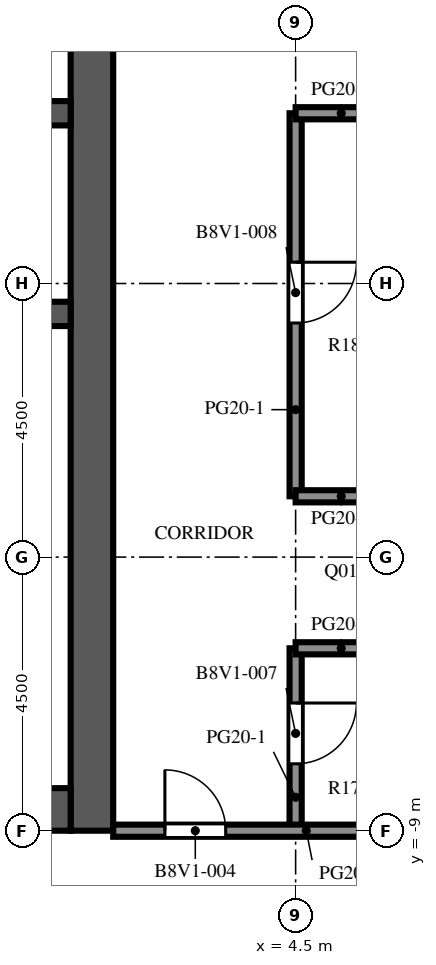
"""IFC4 building model, lengths in metres.
Left out: names, types, materials, properties, quantities, classifications, styles, units other than length and angle.
Written with IfcOpenShell. Run it as: python <this file> out.ifc"""

import sys

from ifc_helpers import new_model, si_unit, direction, frame, frame_2d, origin, place, context, subcontext, project, spatial, rectangle, extrude, element, fill, save


model = new_model("IFC4")
c1 = context("Model", 3, precision=1e-05, world=origin(), true_north=direction((0.0, 1.0)))
c2 = subcontext(c1, "Body", "Model", "MODEL_VIEW")
j1 = project(units=[si_unit("LENGTHUNIT", "METRE"), si_unit("PLANEANGLEUNIT", "RADIAN")], contexts=[c1])
p1 = place(None, origin())
s1 = spatial("IfcSite", under=j1, at=p1, CompositionType="ELEMENT")
p2 = place(p1, origin())
s2 = spatial("IfcBuilding", under=s1, at=p2, CompositionType="ELEMENT")
p3 = place(p2, frame((0.0, 0.0, 274.5)))
s3 = spatial("IfcBuildingStorey", under=s2, at=p3, CompositionType="ELEMENT", Elevation=274.5)
p4 = place(p3, frame((1.15, -9.0, 0.0), z_axis=(0.0, 0.0, 1.0), x_axis=(0.0, 1.0, 0.0)))
e1 = element("IfcWall", 1, at=p4, inside=s3, PredefinedType="SHEAR", context=c2, shape_type="SweptSolid", body=[
    extrude(rectangle(XDim=27.5, YDim=0.7, at=frame_2d((13.75, 0.0))), origin(), (0.0, 0.0, 1.0), 4.1),
])
p5 = place(p4, frame((12.55, 0.0, 0.0)))
e2 = element("IfcOpeningElement", 2, at=p5, cuts=e1, PredefinedType="OPENING", context=c2, shape_type="SweptSolid", body=[
    extrude(rectangle(XDim=2.4, YDim=2.4, at=frame_2d((1.2, 1.2))), frame((0.0, 0.36, 0.0), z_axis=(0.0, -1.0, 0.0), x_axis=(1.0, 0.0, 0.0)), (0.0, 0.0, 1.0), 0.72),
])
p6 = place(p4, frame((3.9, 0.0, 0.0)))
e3 = element("IfcOpeningElement", 3, at=p6, cuts=e1, PredefinedType="OPENING", context=c2, shape_type="SweptSolid", body=[
    extrude(rectangle(XDim=1.2, YDim=2.1, at=frame_2d((0.6, 1.05))), frame((0.0, 0.36, 0.0), z_axis=(0.0, -1.0, 0.0), x_axis=(1.0, 0.0, 0.0)), (0.0, 0.0, 1.0), 0.72),
])
p7 = place(p4, frame((19.46, 0.0, 0.0)))
e4 = element("IfcOpeningElement", 4, at=p7, cuts=e1, PredefinedType="OPENING", context=c2, shape_type="SweptSolid", body=[
    extrude(rectangle(XDim=1.0, YDim=2.1, at=frame_2d((0.5, 1.05))), frame((0.0, 0.36, 0.0), z_axis=(0.0, -1.0, 0.0), x_axis=(1.0, 0.0, 0.0)), (0.0, 0.0, 1.0), 0.72),
])
p8 = place(p4, frame((21.17, 0.0, 0.0)))
e5 = element("IfcOpeningElement", 5, at=p8, cuts=e1, PredefinedType="OPENING", context=c2, shape_type="SweptSolid", body=[
    extrude(rectangle(XDim=1.0, YDim=2.1, at=frame_2d((0.5, 1.05))), frame((0.0, 0.36, 0.0), z_axis=(0.0, -1.0, 0.0), x_axis=(1.0, 0.0, 0.0)), (0.0, 0.0, 1.0), 0.72),
])
p9 = place(p4, frame((23.26, 0.0, 0.0)))
e6 = element("IfcOpeningElement", 6, at=p9, cuts=e1, PredefinedType="OPENING", context=c2, shape_type="SweptSolid", body=[
    extrude(rectangle(XDim=1.0, YDim=2.1, at=frame_2d((0.5, 1.05))), frame((0.0, 0.36, 0.0), z_axis=(0.0, -1.0, 0.0), x_axis=(1.0, 0.0, 0.0)), (0.0, 0.0, 1.0), 0.72),
])
p10 = place(p4, frame((25.35, 0.0, 0.0)))
e7 = element("IfcOpeningElement", 7, at=p10, cuts=e1, PredefinedType="OPENING", context=c2, shape_type="SweptSolid", body=[
    extrude(rectangle(XDim=1.0, YDim=2.1, at=frame_2d((0.5, 1.05))), frame((0.0, 0.36, 0.0), z_axis=(0.0, -1.0, 0.0), x_axis=(1.0, 0.0, 0.0)), (0.0, 0.0, 1.0), 0.72),
])
p11 = place(p3, frame((-9.8, -8.65, 0.0), z_axis=(0.0, 0.0, 1.0), x_axis=(1.0, 0.0, 0.0)))
e8 = element("IfcWall", 8, at=p11, inside=s3, PredefinedType="SHEAR", context=c2, shape_type="SweptSolid", body=[
    extrude(rectangle(XDim=10.6, YDim=0.7, at=frame_2d((5.3, 0.0))), origin(), (0.0, 0.0, 1.0), 4.1),
])
p12 = place(p3, frame((-9.8, -0.5, 0.0), z_axis=(0.0, 0.0, 1.0), x_axis=(1.0, 0.0, 0.0)))
e9 = element("IfcWall", 9, at=p12, inside=s3, PredefinedType="SHEAR", context=c2, shape_type="SweptSolid", body=[
    extrude(rectangle(XDim=10.6, YDim=0.4, at=frame_2d((5.3, 0.0))), origin(), (0.0, 0.0, 1.0), 4.1),
])
p13 = place(p3, frame((-9.8, 2.8, 0.0), z_axis=(0.0, 0.0, 1.0), x_axis=(1.0, 0.0, 0.0)))
e10 = element("IfcWall", 10, at=p13, inside=s3, PredefinedType="SHEAR", context=c2, shape_type="SweptSolid", body=[
    extrude(rectangle(XDim=10.6, YDim=0.4, at=frame_2d((5.3, 0.0))), origin(), (0.0, 0.0, 1.0), 4.1),
])
p14 = place(p13, frame((0.688, 0.0, 0.0)))
e11 = element("IfcOpeningElement", 11, at=p14, cuts=e10, PredefinedType="OPENING", context=c2, shape_type="SweptSolid", body=[
    extrude(rectangle(XDim=1.1, YDim=2.1, at=frame_2d((0.55, 1.05))), frame((0.0, 0.21, 0.0), z_axis=(0.0, -1.0, 0.0), x_axis=(1.0, 0.0, 0.0)), (0.0, 0.0, 1.0), 0.42),
])
p15 = place(p13, frame((3.438, 0.0, 0.0)))
e12 = element("IfcOpeningElement", 12, at=p15, cuts=e10, PredefinedType="OPENING", context=c2, shape_type="SweptSolid", body=[
    extrude(rectangle(XDim=1.1, YDim=2.1, at=frame_2d((0.55, 1.05))), frame((0.0, 0.21, 0.0), z_axis=(0.0, -1.0, 0.0), x_axis=(1.0, 0.0, 0.0)), (0.0, 0.0, 1.0), 0.42),
])
p16 = place(p13, frame((6.113, 0.0, 0.0)))
e13 = element("IfcOpeningElement", 13, at=p16, cuts=e10, PredefinedType="OPENING", context=c2, shape_type="SweptSolid", body=[
    extrude(rectangle(XDim=1.0, YDim=2.1, at=frame_2d((0.5, 1.05))), frame((0.0, 0.21, 0.0), z_axis=(0.0, -1.0, 0.0), x_axis=(1.0, 0.0, 0.0)), (0.0, 0.0, 1.0), 0.42),
])
p17 = place(p13, frame((8.863, 0.0, 0.0)))
e14 = element("IfcOpeningElement", 14, at=p17, cuts=e10, PredefinedType="OPENING", context=c2, shape_type="SweptSolid", body=[
    extrude(rectangle(XDim=1.0, YDim=2.1, at=frame_2d((0.5, 1.05))), frame((0.0, 0.21, 0.0), z_axis=(0.0, -1.0, 0.0), x_axis=(1.0, 0.0, 0.0)), (0.0, 0.0, 1.0), 0.42),
])
p18 = place(p3, frame((-0.8, -6.02, 0.0), z_axis=(0.0, 0.0, 1.0), x_axis=(1.0, 0.0, 0.0)))
e15 = element("IfcWall", 15, at=p18, inside=s3, PredefinedType="PARTITIONING", context=c2, shape_type="SweptSolid", body=[
    extrude(rectangle(XDim=1.6, YDim=0.1, at=frame_2d((0.8, 0.0))), origin(), (0.0, 0.0, 1.0), 3.65),
])
p19 = place(p18, frame((0.3, 0.0, 0.0)))
e16 = element("IfcOpeningElement", 16, at=p19, cuts=e15, PredefinedType="OPENING", context=c2, shape_type="SweptSolid", body=[
    extrude(rectangle(XDim=1.0, YDim=2.1, at=frame_2d((0.5, 1.05))), frame((0.0, 0.06, 0.0), z_axis=(0.0, -1.0, 0.0), x_axis=(1.0, 0.0, 0.0)), (0.0, 0.0, 1.0), 0.12),
])
p20 = place(p3, frame((-0.8, -2.98, 0.0), z_axis=(0.0, 0.0, 1.0), x_axis=(1.0, 0.0, 0.0)))
e17 = element("IfcWall", 17, at=p20, inside=s3, PredefinedType="PARTITIONING", context=c2, shape_type="SweptSolid", body=[
    extrude(rectangle(XDim=1.6, YDim=0.1, at=frame_2d((0.8, 0.0))), origin(), (0.0, 0.0, 1.0), 3.65),
])
p21 = place(p20, frame((0.3, 0.0, 0.0)))
e18 = element("IfcOpeningElement", 18, at=p21, cuts=e17, PredefinedType="OPENING", context=c2, shape_type="SweptSolid", body=[
    extrude(rectangle(XDim=1.0, YDim=2.1, at=frame_2d((0.5, 1.05))), frame((0.0, 0.06, 0.0), z_axis=(0.0, -1.0, 0.0), x_axis=(1.0, 0.0, 0.0)), (0.0, 0.0, 1.0), 0.12),
])
p22 = place(p3, frame((4.5, -6.0, 0.0), z_axis=(0.0, 0.0, 1.0), x_axis=(0.0, -1.0, 0.0)))
e19 = element("IfcWall", 19, at=p22, inside=s3, PredefinedType="PARTITIONING", context=c2, shape_type="SweptSolid", body=[
    extrude(rectangle(XDim=3.0, YDim=0.2, at=frame_2d((1.5, 0.0))), origin(), (0.0, 0.0, 1.0), 3.65),
])
p23 = place(p22, frame((0.9, 0.0, 0.0)))
e20 = element("IfcOpeningElement", 20, at=p23, cuts=e19, PredefinedType="OPENING", context=c2, shape_type="SweptSolid", body=[
    extrude(rectangle(XDim=1.0, YDim=2.1, at=frame_2d((0.5, 1.05))), frame((0.0, 0.11, 0.0), z_axis=(0.0, -1.0, 0.0), x_axis=(1.0, 0.0, 0.0)), (0.0, 0.0, 1.0), 0.22),
])
p24 = place(p3, frame((4.5, 2.8, 0.0), z_axis=(0.0, 0.0, 1.0), x_axis=(0.0, -1.0, 0.0)))
e21 = element("IfcWall", 21, at=p24, inside=s3, PredefinedType="PARTITIONING", context=c2, shape_type="SweptSolid", body=[
    extrude(rectangle(XDim=6.3, YDim=0.2, at=frame_2d((3.15, 0.0))), origin(), (0.0, 0.0, 1.0), 3.65),
])
p25 = place(p24, frame((2.45, 0.0, 0.0)))
e22 = element("IfcOpeningElement", 22, at=p25, cuts=e21, PredefinedType="OPENING", context=c2, shape_type="SweptSolid", body=[
    extrude(rectangle(XDim=1.0, YDim=2.1, at=frame_2d((0.5, 1.05))), frame((0.0, 0.11, 0.0), z_axis=(0.0, -1.0, 0.0), x_axis=(1.0, 0.0, 0.0)), (0.0, 0.0, 1.0), 0.22),
])
p26 = place(p3, frame((6.0, -9.0, 0.0), z_axis=(0.0, 0.0, 1.0), x_axis=(-1.0, 0.0, 0.0)))
e23 = element("IfcWall", 23, at=p26, inside=s3, PredefinedType="PARTITIONING", context=c2, shape_type="SweptSolid", body=[
    extrude(rectangle(XDim=4.5, YDim=0.2, at=frame_2d((2.25, 0.0))), origin(), (0.0, 0.0, 1.0), 3.65),
])
p27 = place(p26, frame((2.65, 0.0, 0.0)))
e24 = element("IfcOpeningElement", 24, at=p27, cuts=e23, PredefinedType="OPENING", context=c2, shape_type="SweptSolid", body=[
    extrude(rectangle(XDim=1.0, YDim=2.1, at=frame_2d((0.5, 1.05))), frame((0.0, 0.11, 0.0), z_axis=(0.0, -1.0, 0.0), x_axis=(1.0, 0.0, 0.0)), (0.0, 0.0, 1.0), 0.22),
])
for number, where, z_axis, x_axis in (
    (25, (4.5, -6.0, 0.0), (0.0, 0.0, 1.0), (1.0, 0.0, 0.0)),
    (26, (4.5, -3.5, 0.0), (0.0, 0.0, 1.0), (1.0, 0.0, 0.0)),
    (27, (4.5, 2.8, 0.0), (0.0, 0.0, 1.0), (1.0, 0.0, 0.0)),
):
    element("IfcWall", number, at=place(p3, frame(where, z_axis=z_axis, x_axis=x_axis)), inside=s3, PredefinedType="PARTITIONING", context=c2, shape_type="SweptSolid", body=[
        extrude(rectangle(XDim=1.5, YDim=0.2, at=frame_2d((0.75, 0.0))), origin(), (0.0, 0.0, 1.0), 3.65),
    ])
p28 = place(p5, origin())
e28 = element("IfcDoor", 28, at=p28, inside=s3, OperationType="DOUBLE_DOOR_DOUBLE_SWING", PredefinedType="DOOR", context=c2, shape_type="SweptSolid", body=[
    extrude(rectangle(XDim=2.4, YDim=2.4, at=frame_2d((1.2, 1.2))), frame((0.0, 0.025, 0.0), z_axis=(0.0, -1.0, 0.0), x_axis=(1.0, 0.0, 0.0)), (0.0, 0.0, 1.0), 0.05),
])
fill(e2, e28)
p29 = place(p6, origin())
e29 = element("IfcDoor", 29, at=p29, inside=s3, OperationType="SINGLE_SWING_LEFT", PredefinedType="DOOR", context=c2, shape_type="SweptSolid", body=[
    extrude(rectangle(XDim=1.2, YDim=2.1, at=frame_2d((0.6, 1.05))), frame((0.0, 0.325, 0.0), z_axis=(0.0, -1.0, 0.0), x_axis=(1.0, 0.0, 0.0)), (0.0, 0.0, 1.0), 0.05),
])
fill(e3, e29)
p30 = place(p27, origin())
e30 = element("IfcDoor", 30, at=p30, inside=s3, OperationType="SINGLE_SWING_RIGHT", PredefinedType="DOOR", context=c2, shape_type="SweptSolid", body=[
    extrude(rectangle(XDim=1.0, YDim=2.1, at=frame_2d((0.5, 1.05))), frame((0.0, 0.025, 0.0), z_axis=(0.0, -1.0, 0.0), x_axis=(1.0, 0.0, 0.0)), (0.0, 0.0, 1.0), 0.05),
])
fill(e24, e30)
p31 = place(p23, origin())
e31 = element("IfcDoor", 31, at=p31, inside=s3, OperationType="SINGLE_SWING_LEFT", PredefinedType="DOOR", context=c2, shape_type="SweptSolid", body=[
    extrude(rectangle(XDim=1.0, YDim=2.1, at=frame_2d((0.5, 1.05))), frame((0.0, 0.025, 0.0), z_axis=(0.0, -1.0, 0.0), x_axis=(1.0, 0.0, 0.0)), (0.0, 0.0, 1.0), 0.05),
])
fill(e20, e31)
p32 = place(p25, origin())
e32 = element("IfcDoor", 32, at=p32, inside=s3, OperationType="SINGLE_SWING_LEFT", PredefinedType="DOOR", context=c2, shape_type="SweptSolid", body=[
    extrude(rectangle(XDim=1.0, YDim=2.1, at=frame_2d((0.5, 1.05))), frame((0.0, 0.025, 0.0), z_axis=(0.0, -1.0, 0.0), x_axis=(1.0, 0.0, 0.0)), (0.0, 0.0, 1.0), 0.05),
])
fill(e22, e32)
save(model, sys.argv[1])
